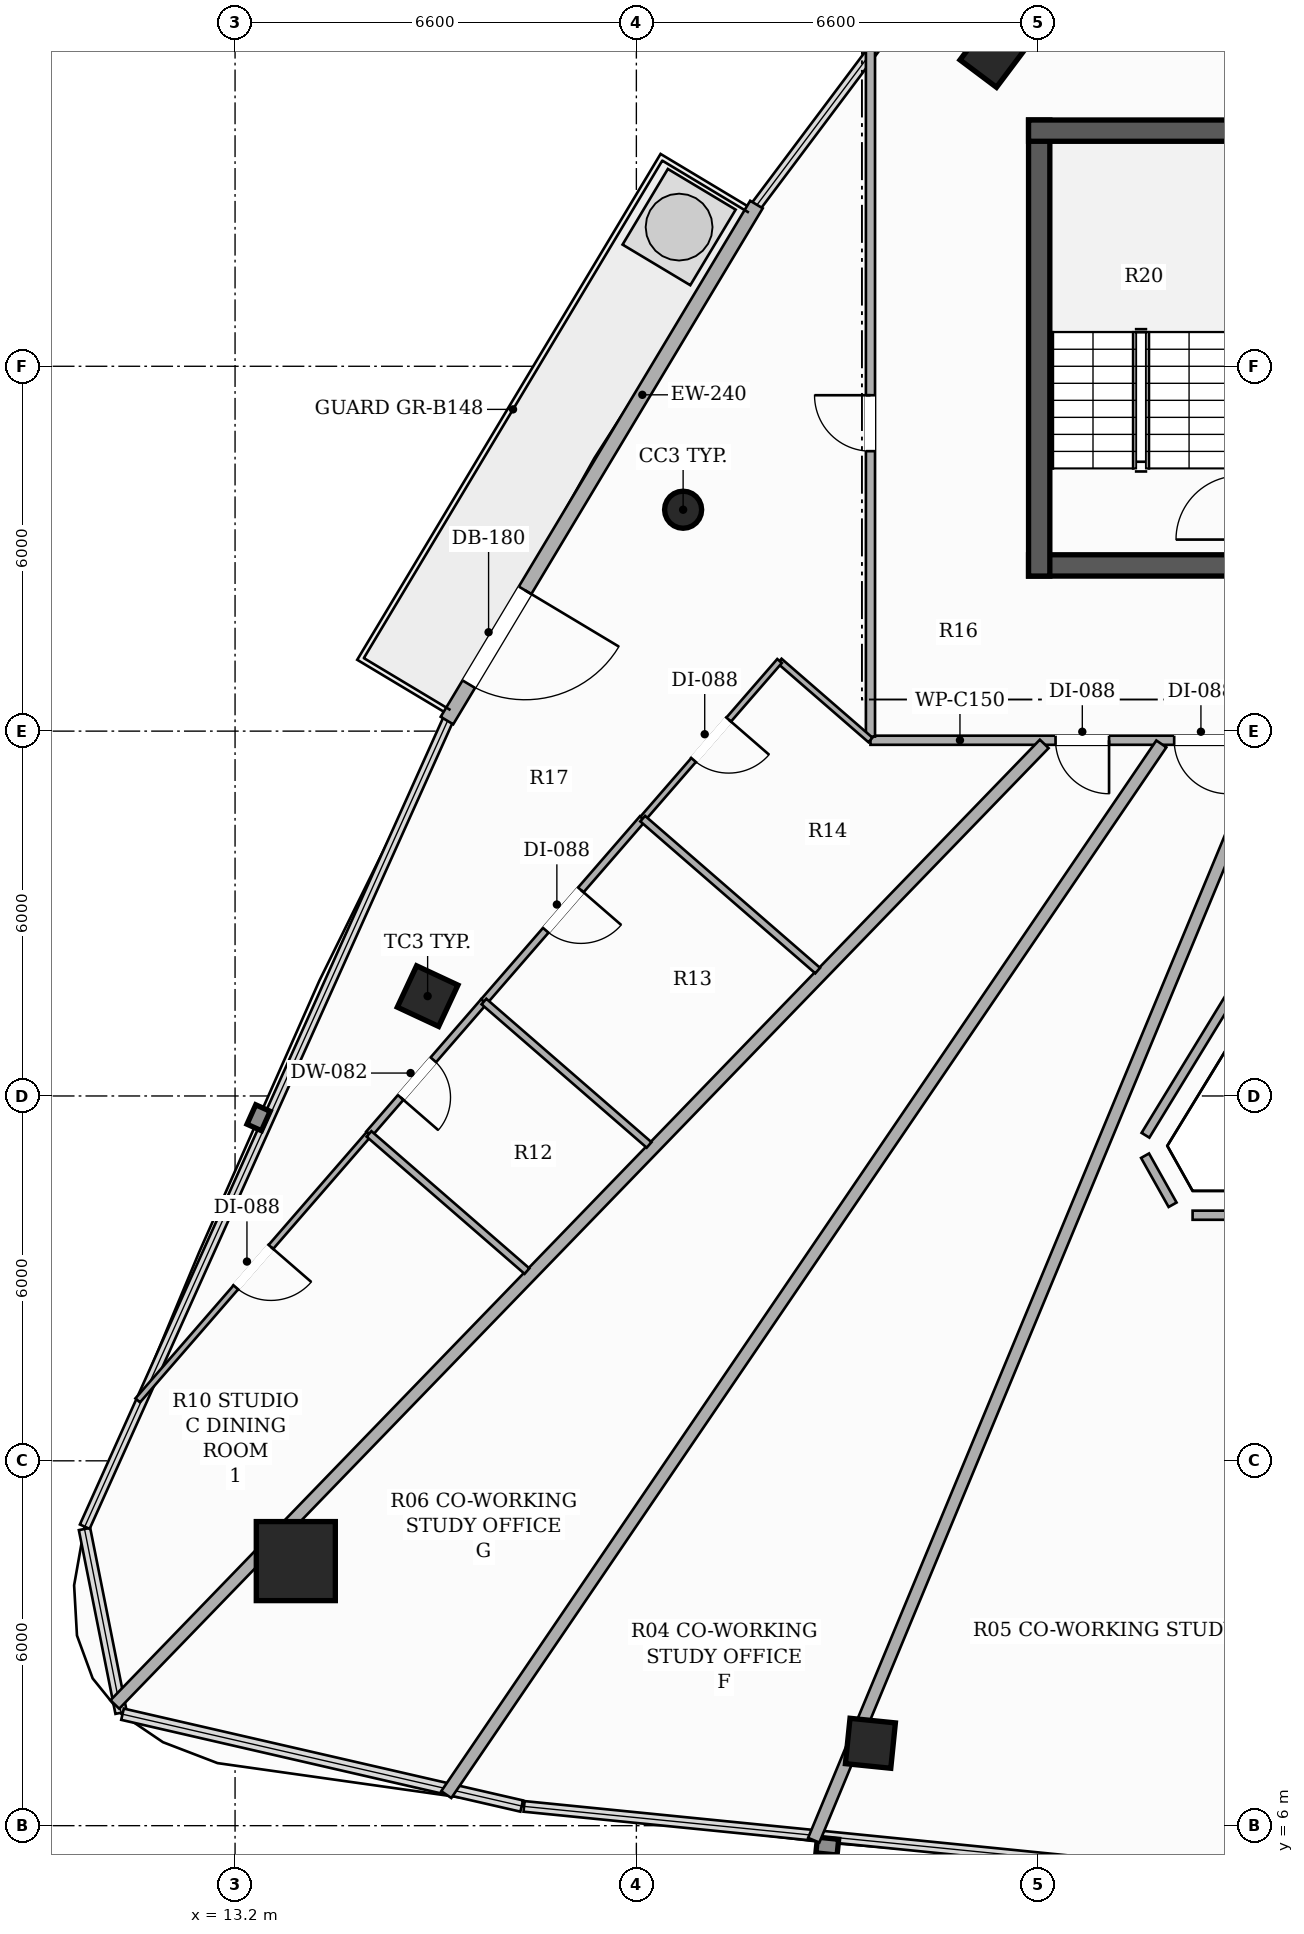
"""IFC4 building model, lengths in metres.
Left out: names, types, materials, properties, quantities, classifications, styles, units other than length and angle.
Written with IfcOpenShell. Run it as: python <this file> out.ifc"""

import sys

from ifc_helpers import new_model, si_unit, direction, frame, frame_2d, origin, origin_2d, place, context, subcontext, project, spatial, rectangle, hollow_rectangle, hollow_circle, extrude, element, fill, save


model = new_model("IFC4")
c1 = context("Model", 3, precision=1e-05, world=origin(), true_north=direction((0.0, 1.0)))
c2 = subcontext(c1, "Body", "Model", "MODEL_VIEW")
j1 = project(units=[si_unit("LENGTHUNIT", "METRE"), si_unit("PLANEANGLEUNIT", "RADIAN")], contexts=[c1])
p1 = place(None, origin())
s1 = spatial("IfcSite", under=j1, at=p1, CompositionType="ELEMENT")
p2 = place(p1, origin())
s2 = spatial("IfcBuilding", under=s1, at=p2, CompositionType="ELEMENT")
p3 = place(p2, frame((0.0, 0.0, 240.35)))
s3 = spatial("IfcBuildingStorey", under=s2, at=p3, CompositionType="ELEMENT", Elevation=240.35)
p4 = place(p3, frame((26.25, 26.725, 0.0), z_axis=(0.0, 0.0, 1.0), x_axis=(1.0, 0.0, 0.0)))
e1 = element("IfcWall", 1, at=p4, inside=s3, PredefinedType="SHEAR", context=c2, shape_type="SweptSolid", body=[
    extrude(rectangle(XDim=13.5, YDim=0.35, at=frame_2d((6.75, 0.0))), origin(), (0.0, 0.0, 1.0), 3.3),
])
p5 = place(p4, frame((4.35, 0.0, 0.0)))
e2 = element("IfcOpeningElement", 2, at=p5, cuts=e1, PredefinedType="OPENING", context=c2, shape_type="SweptSolid", body=[
    extrude(rectangle(XDim=1.05, YDim=2.15, at=frame_2d((0.525, 1.075))), frame((0.0, 0.185, 0.0), z_axis=(0.0, -1.0, 0.0), x_axis=(1.0, 0.0, 0.0)), (0.0, 0.0, 1.0), 0.37),
])
p6 = place(p4, frame((8.3, 0.0, 0.0)))
e3 = element("IfcOpeningElement", 3, at=p6, cuts=e1, PredefinedType="OPENING", context=c2, shape_type="SweptSolid", body=[
    extrude(rectangle(XDim=1.05, YDim=2.15, at=frame_2d((0.525, 1.075))), frame((0.0, 0.185, 0.0), z_axis=(0.0, -1.0, 0.0), x_axis=(1.0, 0.0, 0.0)), (0.0, 0.0, 1.0), 0.37),
])
p7 = place(p3, frame((26.425, 26.55, 0.0), z_axis=(0.0, 0.0, 1.0), x_axis=(0.0, 1.0, 0.0)))
e4 = element("IfcWall", 4, at=p7, inside=s3, PredefinedType="SHEAR", context=c2, shape_type="SweptSolid", body=[
    extrude(rectangle(XDim=7.5, YDim=0.35, at=frame_2d((3.75, 0.0))), origin(), (0.0, 0.0, 1.0), 3.3),
])
p8 = place(p3, frame((26.25, 33.875, 0.0), z_axis=(0.0, 0.0, 1.0), x_axis=(1.0, 0.0, 0.0)))
e5 = element("IfcWall", 5, at=p8, inside=s3, PredefinedType="SHEAR", context=c2, shape_type="SweptSolid", body=[
    extrude(rectangle(XDim=3.6, YDim=0.35, at=frame_2d((1.8, 0.0))), origin(), (0.0, 0.0, 1.0), 3.3),
])
p9 = place(p3, frame((14.199, 10.351, 0.0), z_axis=(0.0, 0.0, 1.0), x_axis=(1.0, 0.0, 0.0)))
e6 = element("IfcColumn", 6, at=p9, inside=s3, PredefinedType="COLUMN", context=c2, shape_type="SweptSolid", body=[
    extrude(hollow_rectangle(XDim=1.3, YDim=1.3, WallThickness=0.04, at=origin_2d()), origin(), (0.0, 0.0, 1.0), 3.3),
])
p10 = place(p3, frame((25.648, 35.113, 0.0), z_axis=(0.0, 0.0, 1.0), x_axis=(0.600420225326, 0.799684658487, 0.0)))
e7 = element("IfcColumn", 7, at=p10, inside=s3, PredefinedType="COLUMN", context=c2, shape_type="SweptSolid", body=[
    extrude(hollow_rectangle(XDim=0.75, YDim=0.75, WallThickness=0.025, at=origin_2d()), origin(), (0.0, 0.0, 1.0), 3.3),
])
p11 = place(p3, frame((20.569, 27.641, 0.0), z_axis=(0.0, 0.0, 1.0), x_axis=(1.0, 0.0, 0.0)))
e8 = element("IfcColumn", 8, at=p11, inside=s3, PredefinedType="COLUMN", context=c2, shape_type="SweptSolid", body=[
    extrude(hollow_circle(Radius=0.305, WallThickness=0.016, at=origin_2d()), origin(), (0.0, 0.0, 1.0), 3.3),
])
for number, where, z_axis, x_axis in (
    (9, (16.367, 19.642, 0.0), (0.0, 0.0, 1.0), (0.423, 0.906, 0.0)),
    (10, (23.649, 7.355, 0.0), (0.0, 0.0, 1.0), (-0.995, 0.101, 0.0)),
):
    element("IfcColumn", number, at=place(p3, frame(where, z_axis=z_axis, x_axis=x_axis)), inside=s3, PredefinedType="COLUMN", context=c2, shape_type="SweptSolid", body=[
        extrude(hollow_rectangle(XDim=0.75, YDim=0.75, WallThickness=0.025, at=origin_2d()), origin(), (0.0, 0.0, 1.0), 3.3),
    ])
p12 = place(p3, frame((21.775, 32.66, 0.0), z_axis=(0.0, 0.0, 1.0), x_axis=(-0.514372387577, -0.857566934354, 0.0)))
e11 = element("IfcWall", 11, at=p12, inside=s3, PredefinedType="SOLIDWALL", context=c2, shape_type="SweptSolid", body=[
    extrude(rectangle(XDim=9.895, YDim=0.24, at=frame_2d((4.948, 0.0))), origin(), (0.0, 0.0, 1.0), 2.624),
])
p13 = place(p12, frame((7.398, 0.0, 0.0)))
e12 = element("IfcOpeningElement", 12, at=p13, cuts=e11, PredefinedType="OPENING", context=c2, shape_type="SweptSolid", body=[
    extrude(rectangle(XDim=1.8, YDim=2.2, at=frame_2d((0.9, 1.1))), frame((0.0, 0.13, 0.0), z_axis=(0.0, -1.0, 0.0), x_axis=(1.0, 0.0, 0.0)), (0.0, 0.0, 1.0), 0.26),
])
p14 = place(p3, frame((32.141, 23.85, 0.0), z_axis=(0.0, 0.0, 1.0), x_axis=(-1.0, 0.0, 0.0)))
e13 = element("IfcWall", 13, at=p14, inside=s3, PredefinedType="PARTITIONING", context=c2, shape_type="SweptSolid", body=[
    extrude(rectangle(XDim=8.491, YDim=0.15, at=frame_2d((4.246, 0.0))), origin(), (0.0, 0.0, 1.0), 2.565),
])
p15 = place(p14, frame((0.848, 0.0, 0.0)))
e14 = element("IfcOpeningElement", 14, at=p15, cuts=e13, PredefinedType="OPENING", context=c2, shape_type="SweptSolid", body=[
    extrude(rectangle(XDim=0.88, YDim=2.1, at=frame_2d((0.44, 1.05))), frame((0.0, 0.085, 0.0), z_axis=(0.0, -1.0, 0.0), x_axis=(1.0, 0.0, 0.0)), (0.0, 0.0, 1.0), 0.17),
])
p16 = place(p14, frame((2.616, 0.0, 0.0)))
e15 = element("IfcOpeningElement", 15, at=p16, cuts=e13, PredefinedType="OPENING", context=c2, shape_type="SweptSolid", body=[
    extrude(rectangle(XDim=0.88, YDim=2.1, at=frame_2d((0.44, 1.05))), frame((0.0, 0.085, 0.0), z_axis=(0.0, -1.0, 0.0), x_axis=(1.0, 0.0, 0.0)), (0.0, 0.0, 1.0), 0.17),
])
p17 = place(p14, frame((4.567, 0.0, 0.0)))
e16 = element("IfcOpeningElement", 16, at=p17, cuts=e13, PredefinedType="OPENING", context=c2, shape_type="SweptSolid", body=[
    extrude(rectangle(XDim=0.88, YDim=2.1, at=frame_2d((0.44, 1.05))), frame((0.0, 0.085, 0.0), z_axis=(0.0, -1.0, 0.0), x_axis=(1.0, 0.0, 0.0)), (0.0, 0.0, 1.0), 0.17),
])
p18 = place(p3, frame((23.65, 23.91, 0.0), z_axis=(0.0, 0.0, 1.0), x_axis=(0.0, 1.0, 0.0)))
e17 = element("IfcWall", 17, at=p18, inside=s3, PredefinedType="PARTITIONING", context=c2, shape_type="SweptSolid", body=[
    extrude(rectangle(XDim=11.337, YDim=0.15, at=frame_2d((5.668, 0.0))), origin(), (0.0, 0.0, 1.0), 2.492),
])
p19 = place(p18, frame((4.694, 0.0, 0.0)))
e18 = element("IfcOpeningElement", 18, at=p19, cuts=e17, PredefinedType="OPENING", context=c2, shape_type="SweptSolid", body=[
    extrude(rectangle(XDim=0.92, YDim=2.15, at=frame_2d((0.46, 1.075))), frame((0.0, 0.085, 0.0), z_axis=(0.0, -1.0, 0.0), x_axis=(1.0, 0.0, 0.0)), (0.0, 0.0, 1.0), 0.17),
])
p20 = place(p3, frame((37.052, 16.039, 0.0), z_axis=(0.0, 0.0, 1.0), x_axis=(-1.0, 0.0, 0.0)))
e19 = element("IfcWall", 19, at=p20, inside=s3, PredefinedType="PARTITIONING", context=c2, shape_type="SweptSolid", body=[
    extrude(rectangle(XDim=8.104, YDim=0.15, at=frame_2d((4.052, 0.0))), origin(), (0.0, 0.0, 1.0), 2.773),
])
p21 = place(p3, frame((28.619, 16.211, 0.0), z_axis=(0.0, 0.0, 1.0), x_axis=(-0.489334167997, 0.872096366252, 0.0)))
e20 = element("IfcWall", 20, at=p21, inside=s3, PredefinedType="PARTITIONING", context=c2, shape_type="SweptSolid", body=[
    extrude(rectangle(XDim=0.926, YDim=0.15, at=frame_2d((0.463, 0.0))), origin(), (0.0, 0.0, 1.0), 3.06),
])
p22 = place(p3, frame((28.173, 17.354, 0.0), z_axis=(0.0, 0.0, 1.0), x_axis=(0.521329541742, 0.85335544113, 0.0)))
e21 = element("IfcWall", 21, at=p22, inside=s3, PredefinedType="PARTITIONING", context=c2, shape_type="SweptSolid", body=[
    extrude(rectangle(XDim=7.542, YDim=0.15, at=frame_2d((3.771, 0.0))), origin(), (0.0, 0.0, 1.0), 2.773),
])
p23 = place(p3, frame((26.508, 23.79, 0.0), z_axis=(0.0, 0.0, 1.0), x_axis=(-0.695365551949, -0.71865621069, 0.0)))
e22 = element("IfcWall", 22, at=p23, inside=s3, PredefinedType="PARTITIONING", context=c2, shape_type="SweptSolid", body=[
    extrude(rectangle(XDim=21.981, YDim=0.2, at=frame_2d((10.991, 0.0))), origin(), (0.0, 0.0, 1.0), 2.492),
])
p24 = place(p3, frame((22.717, 5.761, 0.0), z_axis=(0.0, 0.0, 1.0), x_axis=(0.383820587854, 0.923407686961, 0.0)))
e23 = element("IfcWall", 23, at=p24, inside=s3, PredefinedType="PARTITIONING", context=c2, shape_type="SweptSolid", body=[
    extrude(rectangle(XDim=19.524, YDim=0.2, at=frame_2d((9.762, 0.0))), origin(), (0.0, 0.0, 1.0), 2.492),
])
p25 = place(p3, frame((16.674, 6.511, 0.0), z_axis=(0.0, 0.0, 1.0), x_axis=(0.562645442508, 0.82669831621, 0.0)))
e24 = element("IfcWall", 24, at=p25, inside=s3, PredefinedType="PARTITIONING", context=c2, shape_type="SweptSolid", body=[
    extrude(rectangle(XDim=20.901, YDim=0.2, at=frame_2d((10.451, 0.0))), origin(), (0.0, 0.0, 1.0), 2.492),
])
p26 = place(p3, frame((17.293, 19.553, 0.0), z_axis=(0.0, 0.0, 1.0), x_axis=(-0.655555788219, -0.755146746357, 0.0)))
e25 = element("IfcWall", 25, at=p26, inside=s3, PredefinedType="PARTITIONING", context=c2, shape_type="SweptSolid", body=[
    extrude(rectangle(XDim=2.883, YDim=0.12, at=frame_2d((1.441, 0.0))), origin(), (0.0, 0.0, 1.0), 2.492),
])
p27 = place(p26, frame((1.269, 0.0, 0.0)))
e26 = element("IfcOpeningElement", 26, at=p27, cuts=e25, PredefinedType="OPENING", context=c2, shape_type="SweptSolid", body=[
    extrude(rectangle(XDim=0.82, YDim=2.1, at=frame_2d((0.41, 1.05))), frame((0.0, 0.07, 0.0), z_axis=(0.0, -1.0, 0.0), x_axis=(1.0, 0.0, 0.0)), (0.0, 0.0, 1.0), 0.14),
])
p28 = place(p3, frame((19.904, 22.561, 0.0), z_axis=(0.0, 0.0, 1.0), x_axis=(-0.655518370372, -0.755179227803, 0.0)))
e27 = element("IfcWall", 27, at=p28, inside=s3, PredefinedType="PARTITIONING", context=c2, shape_type="SweptSolid", body=[
    extrude(rectangle(XDim=3.983, YDim=0.12, at=frame_2d((1.992, 0.0))), origin(), (0.0, 0.0, 1.0), 2.773),
])
p29 = place(p28, frame((1.552, 0.0, 0.0)))
e28 = element("IfcOpeningElement", 28, at=p29, cuts=e27, PredefinedType="OPENING", context=c2, shape_type="SweptSolid", body=[
    extrude(rectangle(XDim=0.88, YDim=2.1, at=frame_2d((0.44, 1.05))), frame((0.0, 0.07, 0.0), z_axis=(0.0, -1.0, 0.0), x_axis=(1.0, 0.0, 0.0)), (0.0, 0.0, 1.0), 0.14),
])
p30 = place(p3, frame((15.403, 17.376, 0.0), z_axis=(0.0, 0.0, 1.0), x_axis=(-0.655535791639, -0.755164105265, 0.0)))
e29 = element("IfcWall", 29, at=p30, inside=s3, PredefinedType="PARTITIONING", context=c2, shape_type="SweptSolid", body=[
    extrude(rectangle(XDim=5.803, YDim=0.1, at=frame_2d((2.901, 0.0))), origin(), (0.0, 0.0, 1.0), 2.492),
])
p31 = place(p30, frame((2.461, 0.0, 0.0)))
e30 = element("IfcOpeningElement", 30, at=p31, cuts=e29, PredefinedType="OPENING", context=c2, shape_type="SweptSolid", body=[
    extrude(rectangle(XDim=0.88, YDim=2.1, at=frame_2d((0.44, 1.05))), frame((0.0, 0.06, 0.0), z_axis=(0.0, -1.0, 0.0), x_axis=(1.0, 0.0, 0.0)), (0.0, 0.0, 1.0), 0.12),
])
p32 = place(p3, frame((23.65, 23.855, 0.0), z_axis=(0.0, 0.0, 1.0), x_axis=(-0.755054003076, 0.655662605643, 0.0)))
e31 = element("IfcWall", 31, at=p32, inside=s3, PredefinedType="PARTITIONING", context=c2, shape_type="SweptSolid", body=[
    extrude(rectangle(XDim=1.98, YDim=0.1, at=frame_2d((0.99, 0.0))), origin(), (0.0, 0.0, 1.0), 2.773),
])
p33 = place(p3, frame((22.155, 25.153, 0.0), z_axis=(0.0, 0.0, 1.0), x_axis=(-0.655685588572, -0.755034044888, 0.0)))
e32 = element("IfcWall", 32, at=p33, inside=s3, PredefinedType="PARTITIONING", context=c2, shape_type="SweptSolid", body=[
    extrude(rectangle(XDim=3.433, YDim=0.1, at=frame_2d((1.717, 0.0))), origin(), (0.0, 0.0, 1.0), 2.773),
])
p34 = place(p33, frame((1.276, 0.0, 0.0)))
e33 = element("IfcOpeningElement", 33, at=p34, cuts=e32, PredefinedType="OPENING", context=c2, shape_type="SweptSolid", body=[
    extrude(rectangle(XDim=0.88, YDim=2.1, at=frame_2d((0.44, 1.05))), frame((0.0, 0.06, 0.0), z_axis=(0.0, -1.0, 0.0), x_axis=(1.0, 0.0, 0.0)), (0.0, 0.0, 1.0), 0.12),
])
p35 = place(p3, frame((17.293, 19.553, 0.0), z_axis=(0.0, 0.0, 1.0), x_axis=(0.755140110276, -0.655563432364, 0.0)))
e34 = element("IfcWall", 34, at=p35, inside=s3, PredefinedType="PARTITIONING", context=c2, shape_type="SweptSolid", body=[
    extrude(rectangle(XDim=3.597, YDim=0.12, at=frame_2d((1.798, 0.0))), origin(), (0.0, 0.0, 1.0), 2.565),
])
p36 = place(p3, frame((18.001, 15.12, 0.0), z_axis=(0.0, 0.0, 1.0), x_axis=(-0.755063624175, 0.655651525925, 0.0)))
e35 = element("IfcWall", 35, at=p36, inside=s3, PredefinedType="PARTITIONING", context=c2, shape_type="SweptSolid", body=[
    extrude(rectangle(XDim=3.441, YDim=0.12, at=frame_2d((1.72, 0.0))), origin(), (0.0, 0.0, 1.0), 2.492),
])
p37 = place(p3, frame((19.904, 22.561, 0.0), z_axis=(0.0, 0.0, 1.0), x_axis=(0.755063159293, -0.655652061293, 0.0)))
e36 = element("IfcWall", 36, at=p37, inside=s3, PredefinedType="PARTITIONING", context=c2, shape_type="SweptSolid", body=[
    extrude(rectangle(XDim=3.812, YDim=0.12, at=frame_2d((1.906, 0.0))), origin(), (0.0, 0.0, 1.0), 2.565),
])
p38 = place(p13, origin())
e37 = element("IfcDoor", 37, at=p38, inside=s3, OperationType="SINGLE_SWING_LEFT", PredefinedType="DOOR", context=c2, shape_type="SweptSolid", body=[
    extrude(rectangle(XDim=1.8, YDim=2.2, at=frame_2d((0.9, 1.1))), frame((0.0, 0.025, 0.0), z_axis=(0.0, -1.0, 0.0), x_axis=(1.0, 0.0, 0.0)), (0.0, 0.0, 1.0), 0.05),
])
fill(e12, e37)
p39 = place(p19, origin())
e38 = element("IfcDoor", 38, at=p39, inside=s3, OperationType="SINGLE_SWING_RIGHT", PredefinedType="DOOR", context=c2, shape_type="SweptSolid", body=[
    extrude(rectangle(XDim=0.92, YDim=2.15, at=frame_2d((0.46, 1.075))), frame((0.0, 0.025, 0.0), z_axis=(0.0, -1.0, 0.0), x_axis=(1.0, 0.0, 0.0)), (0.0, 0.0, 1.0), 0.05),
])
fill(e18, e38)
p40 = place(p27, origin())
e39 = element("IfcDoor", 39, at=p40, inside=s3, OperationType="SINGLE_SWING_RIGHT", PredefinedType="DOOR", context=c2, shape_type="SweptSolid", body=[
    extrude(rectangle(XDim=0.82, YDim=2.1, at=frame_2d((0.41, 1.05))), frame((0.0, 0.025, 0.0), z_axis=(0.0, -1.0, 0.0), x_axis=(1.0, 0.0, 0.0)), (0.0, 0.0, 1.0), 0.05),
])
fill(e26, e39)
p41 = place(p29, origin())
e40 = element("IfcDoor", 40, at=p41, inside=s3, OperationType="SINGLE_SWING_LEFT", PredefinedType="DOOR", context=c2, shape_type="SweptSolid", body=[
    extrude(rectangle(XDim=0.88, YDim=2.1, at=frame_2d((0.44, 1.05))), frame((0.0, 0.025, 0.0), z_axis=(0.0, -1.0, 0.0), x_axis=(1.0, 0.0, 0.0)), (0.0, 0.0, 1.0), 0.05),
])
fill(e28, e40)
p42 = place(p31, origin())
e41 = element("IfcDoor", 41, at=p42, inside=s3, OperationType="SINGLE_SWING_LEFT", PredefinedType="DOOR", context=c2, shape_type="SweptSolid", body=[
    extrude(rectangle(XDim=0.88, YDim=2.1, at=frame_2d((0.44, 1.05))), frame((0.0, 0.025, 0.0), z_axis=(0.0, -1.0, 0.0), x_axis=(1.0, 0.0, 0.0)), (0.0, 0.0, 1.0), 0.05),
])
fill(e30, e41)
p43 = place(p34, origin())
e42 = element("IfcDoor", 42, at=p43, inside=s3, OperationType="SINGLE_SWING_LEFT", PredefinedType="DOOR", context=c2, shape_type="SweptSolid", body=[
    extrude(rectangle(XDim=0.88, YDim=2.1, at=frame_2d((0.44, 1.05))), frame((0.0, 0.025, 0.0), z_axis=(0.0, -1.0, 0.0), x_axis=(1.0, 0.0, 0.0)), (0.0, 0.0, 1.0), 0.05),
])
fill(e33, e42)
p44 = place(p16, origin())
e43 = element("IfcDoor", 43, at=p44, inside=s3, OperationType="SINGLE_SWING_LEFT", PredefinedType="DOOR", context=c2, shape_type="SweptSolid", body=[
    extrude(rectangle(XDim=0.88, YDim=2.1, at=frame_2d((0.44, 1.05))), frame((0.0, 0.025, 0.0), z_axis=(0.0, -1.0, 0.0), x_axis=(1.0, 0.0, 0.0)), (0.0, 0.0, 1.0), 0.05),
])
fill(e15, e43)
p45 = place(p17, origin())
e44 = element("IfcDoor", 44, at=p45, inside=s3, OperationType="SINGLE_SWING_LEFT", PredefinedType="DOOR", context=c2, shape_type="SweptSolid", body=[
    extrude(rectangle(XDim=0.88, YDim=2.1, at=frame_2d((0.44, 1.05))), frame((0.0, 0.025, 0.0), z_axis=(0.0, -1.0, 0.0), x_axis=(1.0, 0.0, 0.0)), (0.0, 0.0, 1.0), 0.05),
])
fill(e16, e44)
save(model, sys.argv[1])
